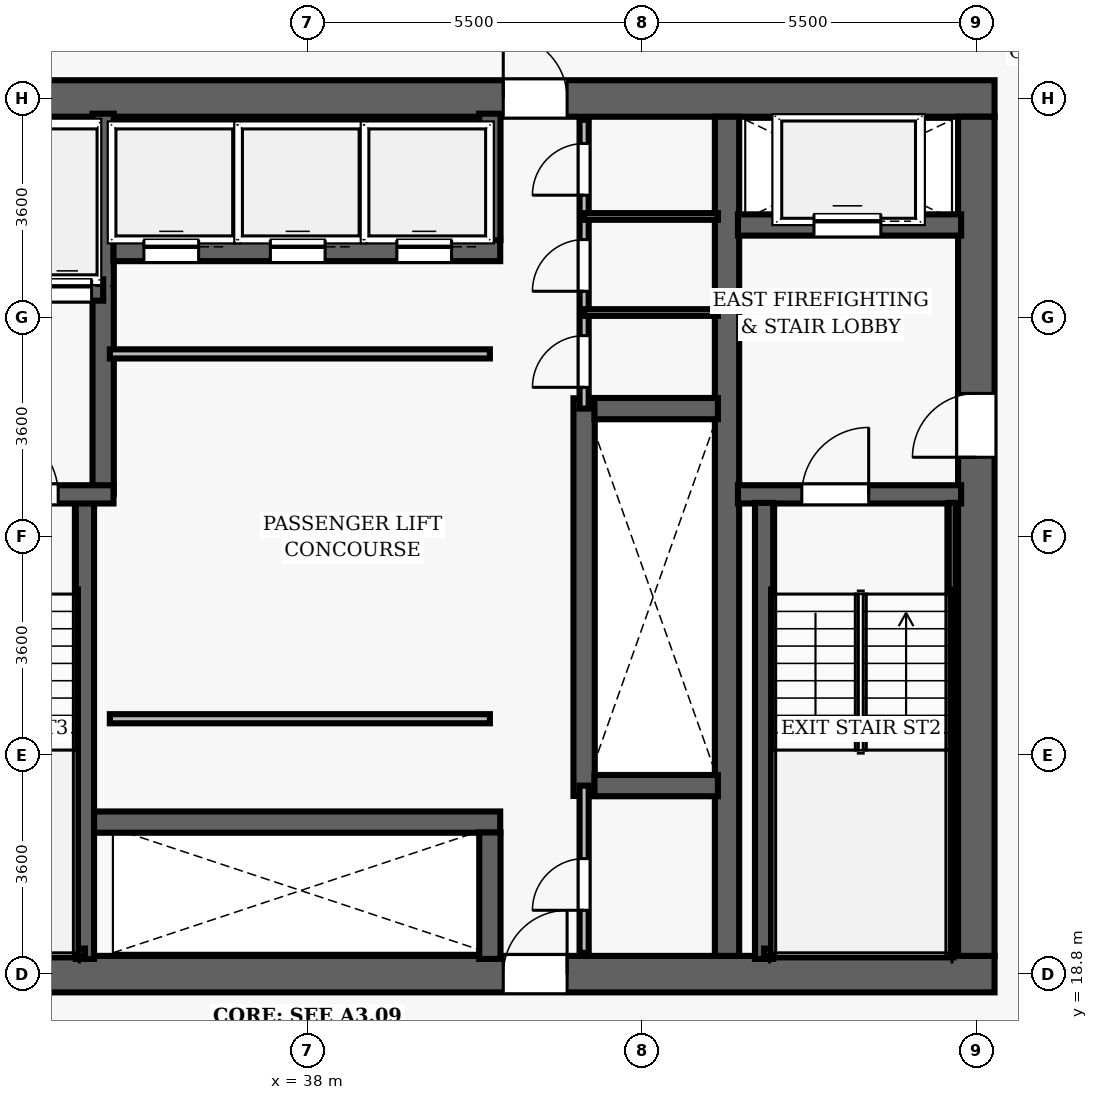
"""IFC4 building model, lengths in metres.
Left out: names, types, materials, properties, quantities, classifications, styles, units other than length and angle.
Written with IfcOpenShell. Run it as: python <this file> out.ifc"""

import sys

from ifc_helpers import new_model, si_unit, direction, frame, frame_2d, origin, place, context, subcontext, project, spatial, rectangle, extrude, element, fill, save


model = new_model("IFC4")
c1 = context("Model", 3, precision=1e-05, world=origin(), true_north=direction((0.0, 1.0)))
c2 = subcontext(c1, "Body", "Model", "MODEL_VIEW")
j1 = project(units=[si_unit("LENGTHUNIT", "METRE"), si_unit("PLANEANGLEUNIT", "RADIAN")], contexts=[c1])
p1 = place(None, origin())
s1 = spatial("IfcSite", under=j1, at=p1, CompositionType="ELEMENT")
p2 = place(p1, origin())
s2 = spatial("IfcBuilding", under=s1, at=p2, CompositionType="ELEMENT")
p3 = place(p2, frame((0.0, 0.0, 93.9)))
s3 = spatial("IfcBuildingStorey", under=s2, at=p3, CompositionType="ELEMENT", Elevation=93.9)
p4 = place(p3, frame((26.7, 18.8, 0.0), z_axis=(0.0, 0.0, 1.0), x_axis=(1.0, 0.0, 0.0)))
e1 = element("IfcWall", 1, at=p4, inside=s3, PredefinedType="SHEAR", context=c2, shape_type="SweptSolid", body=[
    extrude(rectangle(XDim=22.6, YDim=0.6, at=frame_2d((11.3, 0.0))), origin(), (0.0, 0.0, 1.0), 3.5),
])
p5 = place(p4, frame((14.52, 0.0, 0.0)))
e2 = element("IfcOpeningElement", 2, at=p5, cuts=e1, PredefinedType="OPENING", context=c2, shape_type="SweptSolid", body=[
    extrude(rectangle(XDim=1.05, YDim=2.15, at=frame_2d((0.525, 1.075))), frame((0.0, 0.31, 0.0), z_axis=(0.0, -1.0, 0.0), x_axis=(1.0, 0.0, 0.0)), (0.0, 0.0, 1.0), 0.62),
])
p6 = place(p3, frame((26.7, 33.2, 0.0), z_axis=(0.0, 0.0, 1.0), x_axis=(1.0, 0.0, 0.0)))
e3 = element("IfcWall", 3, at=p6, inside=s3, PredefinedType="SHEAR", context=c2, shape_type="SweptSolid", body=[
    extrude(rectangle(XDim=22.6, YDim=0.6, at=frame_2d((11.3, 0.0))), origin(), (0.0, 0.0, 1.0), 3.5),
])
p7 = place(p6, frame((4.62, 0.0, 0.0)))
e4 = element("IfcOpeningElement", 4, at=p7, cuts=e3, PredefinedType="OPENING", context=c2, shape_type="SweptSolid", body=[
    extrude(rectangle(XDim=1.05, YDim=2.15, at=frame_2d((0.525, 1.075))), frame((0.0, 0.31, 0.0), z_axis=(0.0, -1.0, 0.0), x_axis=(1.0, 0.0, 0.0)), (0.0, 0.0, 1.0), 0.62),
])
p8 = place(p6, frame((14.52, 0.0, 0.0)))
e5 = element("IfcOpeningElement", 5, at=p8, cuts=e3, PredefinedType="OPENING", context=c2, shape_type="SweptSolid", body=[
    extrude(rectangle(XDim=1.05, YDim=2.15, at=frame_2d((0.525, 1.075))), frame((0.0, 0.31, 0.0), z_axis=(0.0, -1.0, 0.0), x_axis=(1.0, 0.0, 0.0)), (0.0, 0.0, 1.0), 0.62),
])
p9 = place(p3, frame((49.0, 19.1, 0.0), z_axis=(0.0, 0.0, 1.0), x_axis=(0.0, 1.0, 0.0)))
e6 = element("IfcWall", 6, at=p9, inside=s3, PredefinedType="SHEAR", context=c2, shape_type="SweptSolid", body=[
    extrude(rectangle(XDim=13.8, YDim=0.6, at=frame_2d((6.9, 0.0))), origin(), (0.0, 0.0, 1.0), 3.5),
])
p10 = place(p9, frame((8.2, 0.0, 0.0)))
e7 = element("IfcOpeningElement", 7, at=p10, cuts=e6, PredefinedType="OPENING", context=c2, shape_type="SweptSolid", body=[
    extrude(rectangle(XDim=1.05, YDim=2.15, at=frame_2d((0.525, 1.075))), frame((0.0, 0.31, 0.0), z_axis=(0.0, -1.0, 0.0), x_axis=(1.0, 0.0, 0.0)), (0.0, 0.0, 1.0), 0.62),
])
p11 = place(p3, frame((44.9, 19.1, 0.0), z_axis=(0.0, 0.0, 1.0), x_axis=(0.0, 1.0, 0.0)))
e8 = element("IfcWall", 8, at=p11, inside=s3, PredefinedType="SHEAR", context=c2, shape_type="SweptSolid", body=[
    extrude(rectangle(XDim=13.8, YDim=0.4, at=frame_2d((6.9, 0.0))), origin(), (0.0, 0.0, 1.0), 3.5),
])
p12 = place(p3, frame((45.08, 26.69, 0.0), z_axis=(0.0, 0.0, 1.0), x_axis=(1.0, 0.0, 0.0)))
e9 = element("IfcWall", 9, at=p12, inside=s3, PredefinedType="SHEAR", context=c2, shape_type="SweptSolid", body=[
    extrude(rectangle(XDim=3.67, YDim=0.3, at=frame_2d((1.835, 0.0))), origin(), (0.0, 0.0, 1.0), 3.5),
])
p13 = place(p12, frame((1.05, 0.0, 0.0)))
e10 = element("IfcOpeningElement", 10, at=p13, cuts=e9, PredefinedType="OPENING", context=c2, shape_type="SweptSolid", body=[
    extrude(rectangle(XDim=1.1, YDim=2.15, at=frame_2d((0.55, 1.075))), frame((0.0, 0.16, 0.0), z_axis=(0.0, -1.0, 0.0), x_axis=(1.0, 0.0, 0.0)), (0.0, 0.0, 1.0), 0.32),
])
p14 = place(p3, frame((45.51, 19.05, 0.0), z_axis=(0.0, 0.0, 1.0), x_axis=(0.0, 1.0, 0.0)))
e11 = element("IfcWall", 11, at=p14, inside=s3, PredefinedType="SHEAR", context=c2, shape_type="SweptSolid", body=[
    extrude(rectangle(XDim=7.5, YDim=0.3, at=frame_2d((3.75, 0.0))), origin(), (0.0, 0.0, 1.0), 3.5),
])
p15 = place(p3, frame((48.605, 19.1, 0.0), z_axis=(0.0, 0.0, 1.0), x_axis=(0.0, 1.0, 0.0)))
e12 = element("IfcWall", 12, at=p15, inside=s3, PredefinedType="SHEAR", context=c2, shape_type="SweptSolid", body=[
    extrude(rectangle(XDim=7.45, YDim=0.12, at=frame_2d((3.725, 0.0))), origin(), (0.0, 0.0, 1.0), 3.5),
])
p16 = place(p3, frame((45.51, 19.16, 0.0), z_axis=(0.0, 0.0, 1.0), x_axis=(1.0, 0.0, 0.0)))
e13 = element("IfcWall", 13, at=p16, inside=s3, PredefinedType="SHEAR", context=c2, shape_type="SweptSolid", body=[
    extrude(rectangle(XDim=3.095, YDim=0.12, at=frame_2d((1.547, 0.0))), origin(), (0.0, 0.0, 1.0), 3.5),
])
p17 = place(p3, frame((45.08, 31.12, 0.0), z_axis=(0.0, 0.0, 1.0), x_axis=(1.0, 0.0, 0.0)))
e14 = element("IfcWall", 14, at=p17, inside=s3, PredefinedType="SHEAR", context=c2, shape_type="SweptSolid", body=[
    extrude(rectangle(XDim=3.67, YDim=0.35, at=frame_2d((1.835, 0.0))), origin(), (0.0, 0.0, 1.0), 2.5),
])
p18 = place(p17, frame((1.25, 0.0, 0.0)))
e15 = element("IfcOpeningElement", 15, at=p18, cuts=e14, PredefinedType="OPENING", context=c2, shape_type="SweptSolid", body=[
    extrude(rectangle(XDim=1.1, YDim=2.15, at=frame_2d((0.55, 1.075))), frame((0.0, 0.185, 0.0), z_axis=(0.0, -1.0, 0.0), x_axis=(1.0, 0.0, 0.0)), (0.0, 0.0, 1.0), 0.37),
])
p19 = place(p3, frame((34.34, 19.05, 0.0), z_axis=(0.0, 0.0, 1.0), x_axis=(0.0, 1.0, 0.0)))
e16 = element("IfcWall", 16, at=p19, inside=s3, PredefinedType="SHEAR", context=c2, shape_type="SweptSolid", body=[
    extrude(rectangle(XDim=7.5, YDim=0.3, at=frame_2d((3.75, 0.0))), origin(), (0.0, 0.0, 1.0), 3.5),
])
p20 = place(p3, frame((34.64, 26.69, 0.0), z_axis=(0.0, 0.0, 1.0), x_axis=(0.0, 1.0, 0.0)))
e17 = element("IfcWall", 17, at=p20, inside=s3, PredefinedType="SHEAR", context=c2, shape_type="SweptSolid", body=[
    extrude(rectangle(XDim=6.26, YDim=0.35, at=frame_2d((3.13, 0.0))), origin(), (0.0, 0.0, 1.0), 3.5),
])
p21 = place(p3, frame((31.25, 26.69, 0.0), z_axis=(0.0, 0.0, 1.0), x_axis=(1.0, 0.0, 0.0)))
e18 = element("IfcWall", 18, at=p21, inside=s3, PredefinedType="SHEAR", context=c2, shape_type="SweptSolid", body=[
    extrude(rectangle(XDim=3.56, YDim=0.3, at=frame_2d((1.78, 0.0))), origin(), (0.0, 0.0, 1.0), 3.5),
])
p22 = place(p21, frame((1.55, 0.0, 0.0)))
e19 = element("IfcOpeningElement", 19, at=p22, cuts=e18, PredefinedType="OPENING", context=c2, shape_type="SweptSolid", body=[
    extrude(rectangle(XDim=1.1, YDim=2.15, at=frame_2d((0.55, 1.075))), frame((0.0, 0.16, 0.0), z_axis=(0.0, -1.0, 0.0), x_axis=(1.0, 0.0, 0.0)), (0.0, 0.0, 1.0), 0.32),
])
p23 = place(p3, frame((31.3, 19.16, 0.0), z_axis=(0.0, 0.0, 1.0), x_axis=(1.0, 0.0, 0.0)))
e20 = element("IfcWall", 20, at=p23, inside=s3, PredefinedType="SHEAR", context=c2, shape_type="SweptSolid", body=[
    extrude(rectangle(XDim=3.04, YDim=0.12, at=frame_2d((1.52, 0.0))), origin(), (0.0, 0.0, 1.0), 3.5),
])
p24 = place(p3, frame((32.23, 30.05, 0.0), z_axis=(0.0, 0.0, 1.0), x_axis=(1.0, 0.0, 0.0)))
e21 = element("IfcWall", 21, at=p24, inside=s3, PredefinedType="SHEAR", context=c2, shape_type="SweptSolid", body=[
    extrude(rectangle(XDim=2.41, YDim=0.35, at=frame_2d((1.205, 0.0))), origin(), (0.0, 0.0, 1.0), 2.5),
])
p25 = place(p24, frame((0.42, 0.0, 0.0)))
e22 = element("IfcOpeningElement", 22, at=p25, cuts=e21, PredefinedType="OPENING", context=c2, shape_type="SweptSolid", body=[
    extrude(rectangle(XDim=0.8, YDim=2.15, at=frame_2d((0.4, 1.075))), frame((0.0, 0.185, 0.0), z_axis=(0.0, -1.0, 0.0), x_axis=(1.0, 0.0, 0.0)), (0.0, 0.0, 1.0), 0.37),
])
p26 = place(p24, frame((1.42, 0.0, 0.0)))
e23 = element("IfcOpeningElement", 23, at=p26, cuts=e21, PredefinedType="OPENING", context=c2, shape_type="SweptSolid", body=[
    extrude(rectangle(XDim=0.8, YDim=2.15, at=frame_2d((0.4, 1.075))), frame((0.0, 0.185, 0.0), z_axis=(0.0, -1.0, 0.0), x_axis=(1.0, 0.0, 0.0)), (0.0, 0.0, 1.0), 0.37),
])
p27 = place(p3, frame((42.55, 21.73, 0.0), z_axis=(0.0, 0.0, 1.0), x_axis=(0.0, 1.0, 0.0)))
e24 = element("IfcWall", 24, at=p27, inside=s3, PredefinedType="SHEAR", context=c2, shape_type="SweptSolid", body=[
    extrude(rectangle(XDim=6.54, YDim=0.35, at=frame_2d((3.27, 0.0))), origin(), (0.0, 0.0, 1.0), 2.5),
])
for number, where, z_axis, x_axis in (
    (25, (42.72, 21.9, 0.0), (0.0, 0.0, 1.0), (1.0, 0.0, 0.0)),
    (26, (42.72, 28.1, 0.0), (0.0, 0.0, 1.0), (1.0, 0.0, 0.0)),
):
    element("IfcWall", number, at=place(p3, frame(where, z_axis=z_axis, x_axis=x_axis)), inside=s3, PredefinedType="SHEAR", context=c2, shape_type="SweptSolid", body=[
        extrude(rectangle(XDim=2.03, YDim=0.35, at=frame_2d((1.015, 0.0))), origin(), (0.0, 0.0, 1.0), 2.5),
    ])
p28 = place(p3, frame((34.81, 30.7, 0.0), z_axis=(0.0, 0.0, 1.0), x_axis=(1.0, 0.0, 0.0)))
e27 = element("IfcWall", 27, at=p28, inside=s3, PredefinedType="SHEAR", context=c2, shape_type="SweptSolid", body=[
    extrude(rectangle(XDim=6.36, YDim=0.35, at=frame_2d((3.18, 0.0))), origin(), (0.0, 0.0, 1.0), 2.5),
])
p29 = place(p28, frame((0.5, 0.0, 0.0)))
e28 = element("IfcOpeningElement", 28, at=p29, cuts=e27, PredefinedType="OPENING", context=c2, shape_type="SweptSolid", body=[
    extrude(rectangle(XDim=0.9, YDim=2.15, at=frame_2d((0.45, 1.075))), frame((0.0, 0.185, 0.0), z_axis=(0.0, -1.0, 0.0), x_axis=(1.0, 0.0, 0.0)), (0.0, 0.0, 1.0), 0.37),
])
p30 = place(p28, frame((2.58, 0.0, 0.0)))
e29 = element("IfcOpeningElement", 29, at=p30, cuts=e27, PredefinedType="OPENING", context=c2, shape_type="SweptSolid", body=[
    extrude(rectangle(XDim=0.9, YDim=2.15, at=frame_2d((0.45, 1.075))), frame((0.0, 0.185, 0.0), z_axis=(0.0, -1.0, 0.0), x_axis=(1.0, 0.0, 0.0)), (0.0, 0.0, 1.0), 0.37),
])
p31 = place(p28, frame((4.66, 0.0, 0.0)))
e30 = element("IfcOpeningElement", 30, at=p31, cuts=e27, PredefinedType="OPENING", context=c2, shape_type="SweptSolid", body=[
    extrude(rectangle(XDim=0.9, YDim=2.15, at=frame_2d((0.45, 1.075))), frame((0.0, 0.185, 0.0), z_axis=(0.0, -1.0, 0.0), x_axis=(1.0, 0.0, 0.0)), (0.0, 0.0, 1.0), 0.37),
])
p32 = place(p3, frame((41.0, 30.87, 0.0), z_axis=(0.0, 0.0, 1.0), x_axis=(0.0, 1.0, 0.0)))
e31 = element("IfcWall", 31, at=p32, inside=s3, PredefinedType="SHEAR", context=c2, shape_type="SweptSolid", body=[
    extrude(rectangle(XDim=2.08, YDim=0.35, at=frame_2d((1.04, 0.0))), origin(), (0.0, 0.0, 1.0), 2.5),
])
p33 = place(p3, frame((34.49, 21.3, 0.0), z_axis=(0.0, 0.0, 1.0), x_axis=(1.0, 0.0, 0.0)))
e32 = element("IfcWall", 32, at=p33, inside=s3, PredefinedType="SHEAR", context=c2, shape_type="SweptSolid", body=[
    extrude(rectangle(XDim=6.68, YDim=0.35, at=frame_2d((3.34, 0.0))), origin(), (0.0, 0.0, 1.0), 2.5),
])
p34 = place(p3, frame((41.0, 19.05, 0.0), z_axis=(0.0, 0.0, 1.0), x_axis=(0.0, 1.0, 0.0)))
e33 = element("IfcWall", 33, at=p34, inside=s3, PredefinedType="SHEAR", context=c2, shape_type="SweptSolid", body=[
    extrude(rectangle(XDim=2.08, YDim=0.35, at=frame_2d((1.04, 0.0))), origin(), (0.0, 0.0, 1.0), 2.5),
])
for number, where, z_axis, x_axis in (
    (34, (34.75, 29.0, 0.0), (0.0, 0.0, 1.0), (1.0, 0.0, 0.0)),
    (35, (34.75, 23.0, 0.0), (0.0, 0.0, 1.0), (1.0, 0.0, 0.0)),
):
    element("IfcWall", number, at=place(p3, frame(where, z_axis=z_axis, x_axis=x_axis)), inside=s3, PredefinedType="PARTITIONING", context=c2, shape_type="SweptSolid", body=[
        extrude(rectangle(XDim=6.25, YDim=0.15, at=frame_2d((3.125, 0.0))), origin(), (0.0, 0.0, 1.0), 2.5),
    ])
p35 = place(p3, frame((42.55, 28.1, 0.0), z_axis=(0.0, 0.0, 1.0), x_axis=(0.0, 1.0, 0.0)))
e36 = element("IfcWall", 36, at=p35, inside=s3, PredefinedType="PARTITIONING", context=c2, shape_type="SweptSolid", body=[
    extrude(rectangle(XDim=4.75, YDim=0.15, at=frame_2d((2.375, 0.0))), origin(), (0.0, 0.0, 1.0), 2.5),
])
p36 = place(p35, frame((0.35, 0.0, 0.0)))
e37 = element("IfcOpeningElement", 37, at=p36, cuts=e36, PredefinedType="OPENING", context=c2, shape_type="SweptSolid", body=[
    extrude(rectangle(XDim=0.85, YDim=2.1, at=frame_2d((0.425, 1.05))), frame((0.0, 0.085, 0.0), z_axis=(0.0, -1.0, 0.0), x_axis=(1.0, 0.0, 0.0)), (0.0, 0.0, 1.0), 0.17),
])
p37 = place(p35, frame((1.93, 0.0, 0.0)))
e38 = element("IfcOpeningElement", 38, at=p37, cuts=e36, PredefinedType="OPENING", context=c2, shape_type="SweptSolid", body=[
    extrude(rectangle(XDim=0.85, YDim=2.1, at=frame_2d((0.425, 1.05))), frame((0.0, 0.085, 0.0), z_axis=(0.0, -1.0, 0.0), x_axis=(1.0, 0.0, 0.0)), (0.0, 0.0, 1.0), 0.17),
])
p38 = place(p35, frame((3.51, 0.0, 0.0)))
e39 = element("IfcOpeningElement", 39, at=p38, cuts=e36, PredefinedType="OPENING", context=c2, shape_type="SweptSolid", body=[
    extrude(rectangle(XDim=0.85, YDim=2.1, at=frame_2d((0.425, 1.05))), frame((0.0, 0.085, 0.0), z_axis=(0.0, -1.0, 0.0), x_axis=(1.0, 0.0, 0.0)), (0.0, 0.0, 1.0), 0.17),
])
for number, where, z_axis, x_axis in (
    (40, (42.55, 29.68, 0.0), (0.0, 0.0, 1.0), (1.0, 0.0, 0.0)),
    (41, (42.55, 31.26, 0.0), (0.0, 0.0, 1.0), (1.0, 0.0, 0.0)),
):
    element("IfcWall", number, at=place(p3, frame(where, z_axis=z_axis, x_axis=x_axis)), inside=s3, PredefinedType="PARTITIONING", context=c2, shape_type="SweptSolid", body=[
        extrude(rectangle(XDim=2.2, YDim=0.11, at=frame_2d((1.1, 0.0))), origin(), (0.0, 0.0, 1.0), 2.5),
    ])
p39 = place(p3, frame((42.55, 19.15, 0.0), z_axis=(0.0, 0.0, 1.0), x_axis=(0.0, 1.0, 0.0)))
e42 = element("IfcWall", 42, at=p39, inside=s3, PredefinedType="PARTITIONING", context=c2, shape_type="SweptSolid", body=[
    extrude(rectangle(XDim=2.75, YDim=0.15, at=frame_2d((1.375, 0.0))), origin(), (0.0, 0.0, 1.0), 2.5),
])
p40 = place(p39, frame((0.7, 0.0, 0.0)))
e43 = element("IfcOpeningElement", 43, at=p40, cuts=e42, PredefinedType="OPENING", context=c2, shape_type="SweptSolid", body=[
    extrude(rectangle(XDim=0.85, YDim=2.1, at=frame_2d((0.425, 1.05))), frame((0.0, 0.085, 0.0), z_axis=(0.0, -1.0, 0.0), x_axis=(1.0, 0.0, 0.0)), (0.0, 0.0, 1.0), 0.17),
])
p41 = place(p13, origin())
e44 = element("IfcDoor", 44, at=p41, inside=s3, OperationType="SINGLE_SWING_RIGHT", PredefinedType="DOOR", context=c2, shape_type="SweptSolid", body=[
    extrude(rectangle(XDim=1.1, YDim=2.15, at=frame_2d((0.55, 1.075))), frame((0.0, 0.025, 0.0), z_axis=(0.0, -1.0, 0.0), x_axis=(1.0, 0.0, 0.0)), (0.0, 0.0, 1.0), 0.05),
])
fill(e10, e44)
p42 = place(p10, origin())
e45 = element("IfcDoor", 45, at=p42, inside=s3, OperationType="SINGLE_SWING_LEFT", PredefinedType="DOOR", context=c2, shape_type="SweptSolid", body=[
    extrude(rectangle(XDim=1.05, YDim=2.15, at=frame_2d((0.525, 1.075))), frame((0.0, 0.025, 0.0), z_axis=(0.0, -1.0, 0.0), x_axis=(1.0, 0.0, 0.0)), (0.0, 0.0, 1.0), 0.05),
])
fill(e7, e45)
p43 = place(p22, origin())
e46 = element("IfcDoor", 46, at=p43, inside=s3, OperationType="SINGLE_SWING_LEFT", PredefinedType="DOOR", context=c2, shape_type="SweptSolid", body=[
    extrude(rectangle(XDim=1.1, YDim=2.15, at=frame_2d((0.55, 1.075))), frame((0.0, 0.025, 0.0), z_axis=(0.0, -1.0, 0.0), x_axis=(1.0, 0.0, 0.0)), (0.0, 0.0, 1.0), 0.05),
])
fill(e19, e46)
p44 = place(p8, origin())
e47 = element("IfcDoor", 47, at=p44, inside=s3, OperationType="SINGLE_SWING_LEFT", PredefinedType="DOOR", context=c2, shape_type="SweptSolid", body=[
    extrude(rectangle(XDim=1.05, YDim=2.15, at=frame_2d((0.525, 1.075))), frame((0.0, 0.025, 0.0), z_axis=(0.0, -1.0, 0.0), x_axis=(1.0, 0.0, 0.0)), (0.0, 0.0, 1.0), 0.05),
])
fill(e5, e47)
p45 = place(p5, origin())
e48 = element("IfcDoor", 48, at=p45, inside=s3, OperationType="SINGLE_SWING_RIGHT", PredefinedType="DOOR", context=c2, shape_type="SweptSolid", body=[
    extrude(rectangle(XDim=1.05, YDim=2.15, at=frame_2d((0.525, 1.075))), frame((0.0, 0.025, 0.0), z_axis=(0.0, -1.0, 0.0), x_axis=(1.0, 0.0, 0.0)), (0.0, 0.0, 1.0), 0.05),
])
fill(e2, e48)
p46 = place(p36, origin())
e49 = element("IfcDoor", 49, at=p46, inside=s3, OperationType="SINGLE_SWING_LEFT", PredefinedType="DOOR", context=c2, shape_type="SweptSolid", body=[
    extrude(rectangle(XDim=0.85, YDim=2.1, at=frame_2d((0.425, 1.05))), frame((0.0, 0.025, 0.0), z_axis=(0.0, -1.0, 0.0), x_axis=(1.0, 0.0, 0.0)), (0.0, 0.0, 1.0), 0.05),
])
fill(e37, e49)
p47 = place(p37, origin())
e50 = element("IfcDoor", 50, at=p47, inside=s3, OperationType="SINGLE_SWING_LEFT", PredefinedType="DOOR", context=c2, shape_type="SweptSolid", body=[
    extrude(rectangle(XDim=0.85, YDim=2.1, at=frame_2d((0.425, 1.05))), frame((0.0, 0.025, 0.0), z_axis=(0.0, -1.0, 0.0), x_axis=(1.0, 0.0, 0.0)), (0.0, 0.0, 1.0), 0.05),
])
fill(e38, e50)
p48 = place(p38, origin())
e51 = element("IfcDoor", 51, at=p48, inside=s3, OperationType="SINGLE_SWING_LEFT", PredefinedType="DOOR", context=c2, shape_type="SweptSolid", body=[
    extrude(rectangle(XDim=0.85, YDim=2.1, at=frame_2d((0.425, 1.05))), frame((0.0, 0.025, 0.0), z_axis=(0.0, -1.0, 0.0), x_axis=(1.0, 0.0, 0.0)), (0.0, 0.0, 1.0), 0.05),
])
fill(e39, e51)
p49 = place(p40, origin())
e52 = element("IfcDoor", 52, at=p49, inside=s3, OperationType="SINGLE_SWING_LEFT", PredefinedType="DOOR", context=c2, shape_type="SweptSolid", body=[
    extrude(rectangle(XDim=0.85, YDim=2.1, at=frame_2d((0.425, 1.05))), frame((0.0, 0.025, 0.0), z_axis=(0.0, -1.0, 0.0), x_axis=(1.0, 0.0, 0.0)), (0.0, 0.0, 1.0), 0.05),
])
fill(e43, e52)
p50 = place(p29, origin())
e53 = element("IfcDoor", 53, at=p50, inside=s3, OperationType="SLIDING_TO_LEFT", PredefinedType="DOOR", context=c2, shape_type="SweptSolid", body=[
    extrude(rectangle(XDim=0.9, YDim=2.15, at=frame_2d((0.45, 1.075))), frame((0.0, 0.025, 0.0), z_axis=(0.0, -1.0, 0.0), x_axis=(1.0, 0.0, 0.0)), (0.0, 0.0, 1.0), 0.05),
])
fill(e28, e53)
p51 = place(p30, origin())
e54 = element("IfcDoor", 54, at=p51, inside=s3, OperationType="SLIDING_TO_LEFT", PredefinedType="DOOR", context=c2, shape_type="SweptSolid", body=[
    extrude(rectangle(XDim=0.9, YDim=2.15, at=frame_2d((0.45, 1.075))), frame((0.0, 0.025, 0.0), z_axis=(0.0, -1.0, 0.0), x_axis=(1.0, 0.0, 0.0)), (0.0, 0.0, 1.0), 0.05),
])
fill(e29, e54)
p52 = place(p31, origin())
e55 = element("IfcDoor", 55, at=p52, inside=s3, OperationType="SLIDING_TO_LEFT", PredefinedType="DOOR", context=c2, shape_type="SweptSolid", body=[
    extrude(rectangle(XDim=0.9, YDim=2.15, at=frame_2d((0.45, 1.075))), frame((0.0, 0.025, 0.0), z_axis=(0.0, -1.0, 0.0), x_axis=(1.0, 0.0, 0.0)), (0.0, 0.0, 1.0), 0.05),
])
fill(e30, e55)
p53 = place(p18, origin())
e56 = element("IfcDoor", 56, at=p53, inside=s3, OperationType="SLIDING_TO_LEFT", PredefinedType="DOOR", context=c2, shape_type="SweptSolid", body=[
    extrude(rectangle(XDim=1.1, YDim=2.15, at=frame_2d((0.55, 1.075))), frame((0.0, 0.025, 0.0), z_axis=(0.0, -1.0, 0.0), x_axis=(1.0, 0.0, 0.0)), (0.0, 0.0, 1.0), 0.05),
])
fill(e15, e56)
p54 = place(p26, origin())
e57 = element("IfcDoor", 57, at=p54, inside=s3, OperationType="SLIDING_TO_LEFT", PredefinedType="DOOR", context=c2, shape_type="SweptSolid", body=[
    extrude(rectangle(XDim=0.8, YDim=2.15, at=frame_2d((0.4, 1.075))), frame((0.0, 0.025, 0.0), z_axis=(0.0, -1.0, 0.0), x_axis=(1.0, 0.0, 0.0)), (0.0, 0.0, 1.0), 0.05),
])
fill(e23, e57)
save(model, sys.argv[1])
